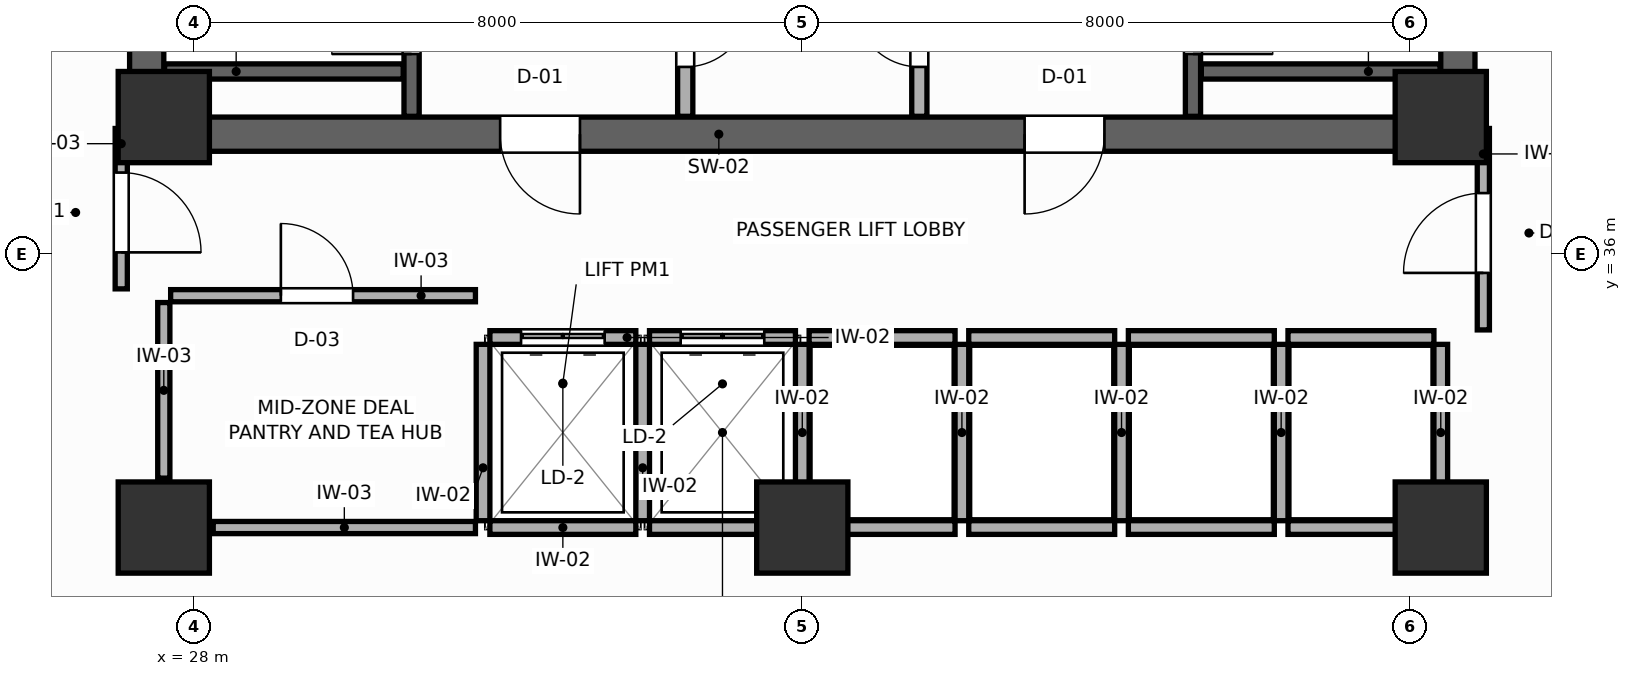
"""IFC4 building model, lengths in metres.
Left out: names, types, materials, properties, quantities, classifications, styles, units other than length and angle.
Written with IfcOpenShell. Run it as: python <this file> out.ifc"""

import sys

from ifc_helpers import new_model, si_unit, direction, frame, frame_2d, origin, origin_2d, place, context, subcontext, project, spatial, rectangle, extrude, source, transform, mapped, element, fill, save


model = new_model("IFC4")
c1 = context("Model", 3, precision=1e-05, world=origin(), true_north=direction((0.0, 1.0)))
c2 = subcontext(c1, "Body", "Model", "MODEL_VIEW")
j1 = project(units=[si_unit("LENGTHUNIT", "METRE"), si_unit("PLANEANGLEUNIT", "RADIAN")], contexts=[c1])
p1 = place(None, origin())
s1 = spatial("IfcSite", under=j1, at=p1, CompositionType="ELEMENT")
p2 = place(p1, origin())
s2 = spatial("IfcBuilding", under=s1, at=p2, CompositionType="ELEMENT")
p3 = place(p2, frame((0.0, 0.0, 150.6)))
s3 = spatial("IfcBuildingStorey", under=s2, at=p3, CompositionType="ELEMENT", Elevation=150.6)
p4 = place(p3, frame((27.15, 37.575, 0.0), z_axis=(0.0, 0.0, 1.0), x_axis=(1.0, 0.0, 0.0)))
e1 = element("IfcWall", 1, at=p4, inside=s3, PredefinedType="SHEAR", context=c2, shape_type="SweptSolid", body=[
    extrude(rectangle(XDim=17.7, YDim=0.45, at=frame_2d((8.85, 0.0))), origin(), (0.0, 0.0, 1.0), 3.6),
])
p5 = place(p4, frame((4.875, 0.0, 0.0)))
e2 = element("IfcOpeningElement", 2, at=p5, cuts=e1, PredefinedType="OPENING", context=c2, shape_type="SweptSolid", body=[
    extrude(rectangle(XDim=1.05, YDim=2.1, at=frame_2d((0.525, 1.05))), frame((0.0, 0.235, 0.0), z_axis=(0.0, -1.0, 0.0), x_axis=(1.0, 0.0, 0.0)), (0.0, 0.0, 1.0), 0.47),
])
p6 = place(p4, frame((11.775, 0.0, 0.0)))
e3 = element("IfcOpeningElement", 3, at=p6, cuts=e1, PredefinedType="OPENING", context=c2, shape_type="SweptSolid", body=[
    extrude(rectangle(XDim=1.05, YDim=2.1, at=frame_2d((0.525, 1.05))), frame((0.0, 0.235, 0.0), z_axis=(0.0, -1.0, 0.0), x_axis=(1.0, 0.0, 0.0)), (0.0, 0.0, 1.0), 0.47),
])
for number, where, z_axis, x_axis in (
    (4, (27.375, 37.8, 0.0), (0.0, 0.0, 1.0), (0.0, 1.0, 0.0)),
    (5, (44.625, 37.8, 0.0), (0.0, 0.0, 1.0), (0.0, 1.0, 0.0)),
):
    element("IfcWall", number, at=place(p3, frame(where, z_axis=z_axis, x_axis=x_axis)), inside=s3, PredefinedType="SHEAR", context=c2, shape_type="SweptSolid", body=[
        extrude(rectangle(XDim=9.0, YDim=0.45, at=frame_2d((4.5, 0.0))), origin(), (0.0, 0.0, 1.0), 3.6),
    ])
m1 = source(origin(), c2, "Body", "SweptSolid", [
    extrude(rectangle(XDim=1.2, YDim=1.2, at=origin_2d()), origin(), (0.0, 0.0, 1.0), 3.6),
])
for number, where, z_axis, x_axis in (
    (6, (27.6, 37.8, 0.0), (0.0, 0.0, 1.0), (1.0, 0.0, 0.0)),
    (7, (44.4, 37.8, 0.0), (0.0, 0.0, 1.0), (1.0, 0.0, 0.0)),
    (8, (27.6, 32.4, 0.0), (0.0, 0.0, 1.0), (1.0, 0.0, 0.0)),
    (9, (44.4, 32.4, 0.0), (0.0, 0.0, 1.0), (1.0, 0.0, 0.0)),
    (10, (36.0, 32.4, 0.0), (0.0, 0.0, 1.0), (1.0, 0.0, 0.0)),
):
    element("IfcColumn", number, at=place(p3, frame(where, z_axis=z_axis, x_axis=x_axis)), inside=s3, PredefinedType="COLUMN", context=c2, shape_type="MappedRepresentation", body=[
        mapped(m1, transform((0.0, 0.0, 0.0), scale=1.0)),
    ])
p7 = place(p3, frame((30.86, 37.81, 0.0), z_axis=(0.0, 0.0, 1.0), x_axis=(0.0, 1.0, 0.0)))
e11 = element("IfcWall", 11, at=p7, inside=s3, PredefinedType="SHEAR", context=c2, shape_type="SweptSolid", body=[
    extrude(rectangle(XDim=8.98, YDim=0.2, at=frame_2d((4.49, 0.0))), origin(), (0.0, 0.0, 1.0), 3.6),
])
p8 = place(p7, frame((0.82, 0.0, 0.0)))
e12 = element("IfcOpeningElement", 12, at=p8, cuts=e11, PredefinedType="OPENING", context=c2, shape_type="SweptSolid", body=[
    extrude(rectangle(XDim=1.05, YDim=2.1, at=frame_2d((0.525, 1.05))), frame((0.0, 0.11, 0.0), z_axis=(0.0, -1.0, 0.0), x_axis=(1.0, 0.0, 0.0)), (0.0, 0.0, 1.0), 0.22),
])
p9 = place(p3, frame((27.61, 38.4, 0.0), z_axis=(0.0, 0.0, 1.0), x_axis=(1.0, 0.0, 0.0)))
e13 = element("IfcWall", 13, at=p9, inside=s3, PredefinedType="SHEAR", context=c2, shape_type="SweptSolid", body=[
    extrude(rectangle(XDim=3.14, YDim=0.2, at=frame_2d((1.57, 0.0))), origin(), (0.0, 0.0, 1.0), 3.6),
])
p10 = place(p3, frame((41.14, 37.81, 0.0), z_axis=(0.0, 0.0, 1.0), x_axis=(0.0, 1.0, 0.0)))
e14 = element("IfcWall", 14, at=p10, inside=s3, PredefinedType="SHEAR", context=c2, shape_type="SweptSolid", body=[
    extrude(rectangle(XDim=8.98, YDim=0.2, at=frame_2d((4.49, 0.0))), origin(), (0.0, 0.0, 1.0), 3.6),
])
p11 = place(p10, frame((0.82, 0.0, 0.0)))
e15 = element("IfcOpeningElement", 15, at=p11, cuts=e14, PredefinedType="OPENING", context=c2, shape_type="SweptSolid", body=[
    extrude(rectangle(XDim=1.05, YDim=2.1, at=frame_2d((0.525, 1.05))), frame((0.0, 0.11, 0.0), z_axis=(0.0, -1.0, 0.0), x_axis=(1.0, 0.0, 0.0)), (0.0, 0.0, 1.0), 0.22),
])
p12 = place(p3, frame((41.25, 38.4, 0.0), z_axis=(0.0, 0.0, 1.0), x_axis=(1.0, 0.0, 0.0)))
e16 = element("IfcWall", 16, at=p12, inside=s3, PredefinedType="SHEAR", context=c2, shape_type="SweptSolid", body=[
    extrude(rectangle(XDim=3.14, YDim=0.2, at=frame_2d((1.57, 0.0))), origin(), (0.0, 0.0, 1.0), 3.6),
])
p13 = place(p3, frame((34.46, 37.81, 0.0), z_axis=(0.0, 0.0, 1.0), x_axis=(0.0, 1.0, 0.0)))
e17 = element("IfcWall", 17, at=p13, inside=s3, PredefinedType="PARTITIONING", context=c2, shape_type="SweptSolid", body=[
    extrude(rectangle(XDim=8.98, YDim=0.2, at=frame_2d((4.49, 0.0))), origin(), (0.0, 0.0, 1.0), 3.4),
])
p14 = place(p13, frame((0.65, 0.0, 0.0)))
e18 = element("IfcOpeningElement", 18, at=p14, cuts=e17, PredefinedType="OPENING", context=c2, shape_type="SweptSolid", body=[
    extrude(rectangle(XDim=0.85, YDim=2.05, at=frame_2d((0.425, 1.025))), frame((0.0, 0.11, 0.0), z_axis=(0.0, -1.0, 0.0), x_axis=(1.0, 0.0, 0.0)), (0.0, 0.0, 1.0), 0.22),
])
p15 = place(p3, frame((37.54, 37.81, 0.0), z_axis=(0.0, 0.0, 1.0), x_axis=(0.0, 1.0, 0.0)))
e19 = element("IfcWall", 19, at=p15, inside=s3, PredefinedType="PARTITIONING", context=c2, shape_type="SweptSolid", body=[
    extrude(rectangle(XDim=8.98, YDim=0.2, at=frame_2d((4.49, 0.0))), origin(), (0.0, 0.0, 1.0), 3.4),
])
p16 = place(p15, frame((0.65, 0.0, 0.0)))
e20 = element("IfcOpeningElement", 20, at=p16, cuts=e19, PredefinedType="OPENING", context=c2, shape_type="SweptSolid", body=[
    extrude(rectangle(XDim=0.85, YDim=2.05, at=frame_2d((0.425, 1.025))), frame((0.0, 0.11, 0.0), z_axis=(0.0, -1.0, 0.0), x_axis=(1.0, 0.0, 0.0)), (0.0, 0.0, 1.0), 0.22),
])
p17 = place(p3, frame((31.89, 34.9, 0.0), z_axis=(0.0, 0.0, 1.0), x_axis=(1.0, 0.0, 0.0)))
e21 = element("IfcWall", 21, at=p17, inside=s3, PredefinedType="PARTITIONING", context=c2, shape_type="SweptSolid", body=[
    extrude(rectangle(XDim=1.92, YDim=0.18, at=frame_2d((0.96, 0.0))), origin(), (0.0, 0.0, 1.0), 3.4),
])
p18 = place(p17, frame((0.41, 0.0, 0.0)))
e22 = element("IfcOpeningElement", 22, at=p18, cuts=e21, PredefinedType="OPENING", context=c2, shape_type="SweptSolid", body=[
    extrude(rectangle(XDim=1.1, YDim=2.1, at=frame_2d((0.55, 1.05))), frame((0.0, 0.1, 0.0), z_axis=(0.0, -1.0, 0.0), x_axis=(1.0, 0.0, 0.0)), (0.0, 0.0, 1.0), 0.2),
])
p19 = place(p3, frame((31.89, 32.4, 0.0), z_axis=(0.0, 0.0, 1.0), x_axis=(1.0, 0.0, 0.0)))
e23 = element("IfcWall", 23, at=p19, inside=s3, PredefinedType="PARTITIONING", context=c2, shape_type="SweptSolid", body=[
    extrude(rectangle(XDim=1.92, YDim=0.18, at=frame_2d((0.96, 0.0))), origin(), (0.0, 0.0, 1.0), 2.95),
])
p20 = place(p3, frame((31.8, 32.49, 0.0), z_axis=(0.0, 0.0, 1.0), x_axis=(0.0, 1.0, 0.0)))
e24 = element("IfcWall", 24, at=p20, inside=s3, PredefinedType="PARTITIONING", context=c2, shape_type="SweptSolid", body=[
    extrude(rectangle(XDim=2.32, YDim=0.18, at=frame_2d((1.16, 0.0))), origin(), (0.0, 0.0, 1.0), 3.4),
])
p21 = place(p3, frame((33.99, 34.9, 0.0), z_axis=(0.0, 0.0, 1.0), x_axis=(1.0, 0.0, 0.0)))
e25 = element("IfcWall", 25, at=p21, inside=s3, PredefinedType="PARTITIONING", context=c2, shape_type="SweptSolid", body=[
    extrude(rectangle(XDim=1.92, YDim=0.18, at=frame_2d((0.96, 0.0))), origin(), (0.0, 0.0, 1.0), 3.4),
])
p22 = place(p21, frame((0.41, 0.0, 0.0)))
e26 = element("IfcOpeningElement", 26, at=p22, cuts=e25, PredefinedType="OPENING", context=c2, shape_type="SweptSolid", body=[
    extrude(rectangle(XDim=1.1, YDim=2.1, at=frame_2d((0.55, 1.05))), frame((0.0, 0.1, 0.0), z_axis=(0.0, -1.0, 0.0), x_axis=(1.0, 0.0, 0.0)), (0.0, 0.0, 1.0), 0.2),
])
p23 = place(p3, frame((33.99, 32.4, 0.0), z_axis=(0.0, 0.0, 1.0), x_axis=(1.0, 0.0, 0.0)))
e27 = element("IfcWall", 27, at=p23, inside=s3, PredefinedType="PARTITIONING", context=c2, shape_type="SweptSolid", body=[
    extrude(rectangle(XDim=1.92, YDim=0.18, at=frame_2d((0.96, 0.0))), origin(), (0.0, 0.0, 1.0), 2.95),
])
p24 = place(p3, frame((33.9, 32.49, 0.0), z_axis=(0.0, 0.0, 1.0), x_axis=(0.0, 1.0, 0.0)))
e28 = element("IfcWall", 28, at=p24, inside=s3, PredefinedType="PARTITIONING", context=c2, shape_type="SweptSolid", body=[
    extrude(rectangle(XDim=2.32, YDim=0.18, at=frame_2d((1.16, 0.0))), origin(), (0.0, 0.0, 1.0), 3.4),
])
p25 = place(p3, frame((36.09, 34.9, 0.0), z_axis=(0.0, 0.0, 1.0), x_axis=(1.0, 0.0, 0.0)))
e29 = element("IfcWall", 29, at=p25, inside=s3, PredefinedType="PARTITIONING", context=c2, shape_type="SweptSolid", body=[
    extrude(rectangle(XDim=1.92, YDim=0.18, at=frame_2d((0.96, 0.0))), origin(), (0.0, 0.0, 1.0), 3.4),
])
p26 = place(p3, frame((36.09, 32.4, 0.0), z_axis=(0.0, 0.0, 1.0), x_axis=(1.0, 0.0, 0.0)))
e30 = element("IfcWall", 30, at=p26, inside=s3, PredefinedType="PARTITIONING", context=c2, shape_type="SweptSolid", body=[
    extrude(rectangle(XDim=1.92, YDim=0.18, at=frame_2d((0.96, 0.0))), origin(), (0.0, 0.0, 1.0), 2.95),
])
p27 = place(p3, frame((36.0, 32.49, 0.0), z_axis=(0.0, 0.0, 1.0), x_axis=(0.0, 1.0, 0.0)))
e31 = element("IfcWall", 31, at=p27, inside=s3, PredefinedType="PARTITIONING", context=c2, shape_type="SweptSolid", body=[
    extrude(rectangle(XDim=2.32, YDim=0.18, at=frame_2d((1.16, 0.0))), origin(), (0.0, 0.0, 1.0), 3.4),
])
p28 = place(p3, frame((38.19, 34.9, 0.0), z_axis=(0.0, 0.0, 1.0), x_axis=(1.0, 0.0, 0.0)))
e32 = element("IfcWall", 32, at=p28, inside=s3, PredefinedType="PARTITIONING", context=c2, shape_type="SweptSolid", body=[
    extrude(rectangle(XDim=1.92, YDim=0.18, at=frame_2d((0.96, 0.0))), origin(), (0.0, 0.0, 1.0), 3.4),
])
p29 = place(p3, frame((38.19, 32.4, 0.0), z_axis=(0.0, 0.0, 1.0), x_axis=(1.0, 0.0, 0.0)))
e33 = element("IfcWall", 33, at=p29, inside=s3, PredefinedType="PARTITIONING", context=c2, shape_type="SweptSolid", body=[
    extrude(rectangle(XDim=1.92, YDim=0.18, at=frame_2d((0.96, 0.0))), origin(), (0.0, 0.0, 1.0), 2.95),
])
p30 = place(p3, frame((38.1, 32.49, 0.0), z_axis=(0.0, 0.0, 1.0), x_axis=(0.0, 1.0, 0.0)))
e34 = element("IfcWall", 34, at=p30, inside=s3, PredefinedType="PARTITIONING", context=c2, shape_type="SweptSolid", body=[
    extrude(rectangle(XDim=2.32, YDim=0.18, at=frame_2d((1.16, 0.0))), origin(), (0.0, 0.0, 1.0), 3.4),
])
p31 = place(p3, frame((40.29, 34.9, 0.0), z_axis=(0.0, 0.0, 1.0), x_axis=(1.0, 0.0, 0.0)))
e35 = element("IfcWall", 35, at=p31, inside=s3, PredefinedType="PARTITIONING", context=c2, shape_type="SweptSolid", body=[
    extrude(rectangle(XDim=1.92, YDim=0.18, at=frame_2d((0.96, 0.0))), origin(), (0.0, 0.0, 1.0), 3.4),
])
p32 = place(p3, frame((40.29, 32.4, 0.0), z_axis=(0.0, 0.0, 1.0), x_axis=(1.0, 0.0, 0.0)))
e36 = element("IfcWall", 36, at=p32, inside=s3, PredefinedType="PARTITIONING", context=c2, shape_type="SweptSolid", body=[
    extrude(rectangle(XDim=1.92, YDim=0.18, at=frame_2d((0.96, 0.0))), origin(), (0.0, 0.0, 1.0), 2.95),
])
p33 = place(p3, frame((40.2, 32.49, 0.0), z_axis=(0.0, 0.0, 1.0), x_axis=(0.0, 1.0, 0.0)))
e37 = element("IfcWall", 37, at=p33, inside=s3, PredefinedType="PARTITIONING", context=c2, shape_type="SweptSolid", body=[
    extrude(rectangle(XDim=2.32, YDim=0.18, at=frame_2d((1.16, 0.0))), origin(), (0.0, 0.0, 1.0), 3.4),
])
p34 = place(p3, frame((42.39, 34.9, 0.0), z_axis=(0.0, 0.0, 1.0), x_axis=(1.0, 0.0, 0.0)))
e38 = element("IfcWall", 38, at=p34, inside=s3, PredefinedType="PARTITIONING", context=c2, shape_type="SweptSolid", body=[
    extrude(rectangle(XDim=1.92, YDim=0.18, at=frame_2d((0.96, 0.0))), origin(), (0.0, 0.0, 1.0), 3.4),
])
p35 = place(p3, frame((42.39, 32.4, 0.0), z_axis=(0.0, 0.0, 1.0), x_axis=(1.0, 0.0, 0.0)))
e39 = element("IfcWall", 39, at=p35, inside=s3, PredefinedType="PARTITIONING", context=c2, shape_type="SweptSolid", body=[
    extrude(rectangle(XDim=1.92, YDim=0.18, at=frame_2d((0.96, 0.0))), origin(), (0.0, 0.0, 1.0), 2.95),
])
for number, where, z_axis, x_axis in (
    (40, (42.3, 32.49, 0.0), (0.0, 0.0, 1.0), (0.0, 1.0, 0.0)),
    (41, (44.4, 32.49, 0.0), (0.0, 0.0, 1.0), (0.0, 1.0, 0.0)),
):
    element("IfcWall", number, at=place(p3, frame(where, z_axis=z_axis, x_axis=x_axis)), inside=s3, PredefinedType="PARTITIONING", context=c2, shape_type="SweptSolid", body=[
        extrude(rectangle(XDim=2.32, YDim=0.18, at=frame_2d((1.16, 0.0))), origin(), (0.0, 0.0, 1.0), 3.4),
    ])
p36 = place(p3, frame((28.25, 32.4, 0.0), z_axis=(0.0, 0.0, 1.0), x_axis=(1.0, 0.0, 0.0)))
e42 = element("IfcWall", 42, at=p36, inside=s3, PredefinedType="PARTITIONING", context=c2, shape_type="SweptSolid", body=[
    extrude(rectangle(XDim=3.45, YDim=0.16, at=frame_2d((1.725, 0.0))), origin(), (0.0, 0.0, 1.0), 2.95),
])
p37 = place(p3, frame((27.6, 33.05, 0.0), z_axis=(0.0, 0.0, 1.0), x_axis=(0.0, 1.0, 0.0)))
e43 = element("IfcWall", 43, at=p37, inside=s3, PredefinedType="PARTITIONING", context=c2, shape_type="SweptSolid", body=[
    extrude(rectangle(XDim=2.31, YDim=0.16, at=frame_2d((1.155, 0.0))), origin(), (0.0, 0.0, 1.0), 3.4),
])
p38 = place(p3, frame((27.69, 35.45, 0.0), z_axis=(0.0, 0.0, 1.0), x_axis=(1.0, 0.0, 0.0)))
e44 = element("IfcWall", 44, at=p38, inside=s3, PredefinedType="PARTITIONING", context=c2, shape_type="SweptSolid", body=[
    extrude(rectangle(XDim=4.01, YDim=0.16, at=frame_2d((2.005, 0.0))), origin(), (0.0, 0.0, 1.0), 3.4),
])
p39 = place(p38, frame((1.45, 0.0, 0.0)))
e45 = element("IfcOpeningElement", 45, at=p39, cuts=e44, PredefinedType="OPENING", context=c2, shape_type="SweptSolid", body=[
    extrude(rectangle(XDim=0.95, YDim=2.05, at=frame_2d((0.475, 1.025))), frame((0.0, 0.09, 0.0), z_axis=(0.0, -1.0, 0.0), x_axis=(1.0, 0.0, 0.0)), (0.0, 0.0, 1.0), 0.18),
])
p40 = place(p3, frame((27.04, 35.54, 0.0), z_axis=(0.0, 0.0, 1.0), x_axis=(0.0, 1.0, 0.0)))
e46 = element("IfcWall", 46, at=p40, inside=s3, PredefinedType="PARTITIONING", context=c2, shape_type="SweptSolid", body=[
    extrude(rectangle(XDim=2.11, YDim=0.16, at=frame_2d((1.055, 0.0))), origin(), (0.0, 0.0, 1.0), 3.4),
])
p41 = place(p40, frame((0.48, 0.0, 0.0)))
e47 = element("IfcOpeningElement", 47, at=p41, cuts=e46, PredefinedType="OPENING", context=c2, shape_type="SweptSolid", body=[
    extrude(rectangle(XDim=1.05, YDim=2.1, at=frame_2d((0.525, 1.05))), frame((0.0, 0.09, 0.0), z_axis=(0.0, -1.0, 0.0), x_axis=(1.0, 0.0, 0.0)), (0.0, 0.0, 1.0), 0.18),
])
p42 = place(p3, frame((44.96, 35.0, 0.0), z_axis=(0.0, 0.0, 1.0), x_axis=(0.0, 1.0, 0.0)))
e48 = element("IfcWall", 48, at=p42, inside=s3, PredefinedType="PARTITIONING", context=c2, shape_type="SweptSolid", body=[
    extrude(rectangle(XDim=2.65, YDim=0.16, at=frame_2d((1.325, 0.0))), origin(), (0.0, 0.0, 1.0), 3.4),
])
p43 = place(p42, frame((0.75, 0.0, 0.0)))
e49 = element("IfcOpeningElement", 49, at=p43, cuts=e48, PredefinedType="OPENING", context=c2, shape_type="SweptSolid", body=[
    extrude(rectangle(XDim=1.05, YDim=2.1, at=frame_2d((0.525, 1.05))), frame((0.0, 0.09, 0.0), z_axis=(0.0, -1.0, 0.0), x_axis=(1.0, 0.0, 0.0)), (0.0, 0.0, 1.0), 0.18),
])
p44 = place(p8, origin())
e50 = element("IfcDoor", 50, at=p44, inside=s3, OperationType="SINGLE_SWING_LEFT", PredefinedType="DOOR", context=c2, shape_type="SweptSolid", body=[
    extrude(rectangle(XDim=1.05, YDim=2.1, at=frame_2d((0.525, 1.05))), frame((0.0, 0.025, 0.0), z_axis=(0.0, -1.0, 0.0), x_axis=(1.0, 0.0, 0.0)), (0.0, 0.0, 1.0), 0.05),
])
fill(e12, e50)
p45 = place(p11, frame((1.05, 0.0, 0.0), z_axis=(0.0, 0.0, 1.0), x_axis=(-1.0, 0.0, 0.0)))
e51 = element("IfcDoor", 51, at=p45, inside=s3, OperationType="SINGLE_SWING_RIGHT", PredefinedType="DOOR", context=c2, shape_type="SweptSolid", body=[
    extrude(rectangle(XDim=1.05, YDim=2.1, at=frame_2d((0.525, 1.05))), frame((0.0, 0.025, 0.0), z_axis=(0.0, -1.0, 0.0), x_axis=(1.0, 0.0, 0.0)), (0.0, 0.0, 1.0), 0.05),
])
fill(e15, e51)
p46 = place(p14, frame((0.85, 0.0, 0.0), z_axis=(0.0, 0.0, 1.0), x_axis=(-1.0, 0.0, 0.0)))
e52 = element("IfcDoor", 52, at=p46, inside=s3, OperationType="SINGLE_SWING_LEFT", PredefinedType="DOOR", context=c2, shape_type="SweptSolid", body=[
    extrude(rectangle(XDim=0.85, YDim=2.05, at=frame_2d((0.425, 1.025))), frame((0.0, 0.025, 0.0), z_axis=(0.0, -1.0, 0.0), x_axis=(1.0, 0.0, 0.0)), (0.0, 0.0, 1.0), 0.05),
])
fill(e18, e52)
p47 = place(p16, origin())
e53 = element("IfcDoor", 53, at=p47, inside=s3, OperationType="SINGLE_SWING_RIGHT", PredefinedType="DOOR", context=c2, shape_type="SweptSolid", body=[
    extrude(rectangle(XDim=0.85, YDim=2.05, at=frame_2d((0.425, 1.025))), frame((0.0, 0.025, 0.0), z_axis=(0.0, -1.0, 0.0), x_axis=(1.0, 0.0, 0.0)), (0.0, 0.0, 1.0), 0.05),
])
fill(e20, e53)
p48 = place(p18, origin())
e54 = element("IfcDoor", 54, at=p48, inside=s3, OperationType="DOUBLE_DOOR_SLIDING", PredefinedType="DOOR", context=c2, shape_type="SweptSolid", body=[
    extrude(rectangle(XDim=1.1, YDim=2.1, at=frame_2d((0.55, 1.05))), frame((0.0, 0.025, 0.0), z_axis=(0.0, -1.0, 0.0), x_axis=(1.0, 0.0, 0.0)), (0.0, 0.0, 1.0), 0.05),
])
fill(e22, e54)
p49 = place(p22, origin())
e55 = element("IfcDoor", 55, at=p49, inside=s3, OperationType="DOUBLE_DOOR_SLIDING", PredefinedType="DOOR", context=c2, shape_type="SweptSolid", body=[
    extrude(rectangle(XDim=1.1, YDim=2.1, at=frame_2d((0.55, 1.05))), frame((0.0, 0.025, 0.0), z_axis=(0.0, -1.0, 0.0), x_axis=(1.0, 0.0, 0.0)), (0.0, 0.0, 1.0), 0.05),
])
fill(e26, e55)
p50 = place(p39, origin())
e56 = element("IfcDoor", 56, at=p50, inside=s3, OperationType="SINGLE_SWING_LEFT", PredefinedType="DOOR", context=c2, shape_type="SweptSolid", body=[
    extrude(rectangle(XDim=0.95, YDim=2.05, at=frame_2d((0.475, 1.025))), frame((0.0, 0.025, 0.0), z_axis=(0.0, -1.0, 0.0), x_axis=(1.0, 0.0, 0.0)), (0.0, 0.0, 1.0), 0.05),
])
fill(e45, e56)
p51 = place(p41, frame((1.05, 0.0, 0.0), z_axis=(0.0, 0.0, 1.0), x_axis=(-1.0, 0.0, 0.0)))
e57 = element("IfcDoor", 57, at=p51, inside=s3, OperationType="SINGLE_SWING_RIGHT", PredefinedType="DOOR", context=c2, shape_type="SweptSolid", body=[
    extrude(rectangle(XDim=1.05, YDim=2.1, at=frame_2d((0.525, 1.05))), frame((0.0, 0.025, 0.0), z_axis=(0.0, -1.0, 0.0), x_axis=(1.0, 0.0, 0.0)), (0.0, 0.0, 1.0), 0.05),
])
fill(e47, e57)
p52 = place(p43, origin())
e58 = element("IfcDoor", 58, at=p52, inside=s3, OperationType="SINGLE_SWING_LEFT", PredefinedType="DOOR", context=c2, shape_type="SweptSolid", body=[
    extrude(rectangle(XDim=1.05, YDim=2.1, at=frame_2d((0.525, 1.05))), frame((0.0, 0.025, 0.0), z_axis=(0.0, -1.0, 0.0), x_axis=(1.0, 0.0, 0.0)), (0.0, 0.0, 1.0), 0.05),
])
fill(e49, e58)
p53 = place(p5, frame((1.05, 0.0, 0.0), z_axis=(0.0, 0.0, 1.0), x_axis=(-1.0, 0.0, 0.0)))
e59 = element("IfcDoor", 59, at=p53, inside=s3, OperationType="SINGLE_SWING_LEFT", PredefinedType="DOOR", context=c2, shape_type="SweptSolid", body=[
    extrude(rectangle(XDim=1.05, YDim=2.1, at=frame_2d((0.525, 1.05))), frame((0.0, 0.025, 0.0), z_axis=(0.0, -1.0, 0.0), x_axis=(1.0, 0.0, 0.0)), (0.0, 0.0, 1.0), 0.05),
])
fill(e2, e59)
p54 = place(p6, frame((1.05, 0.0, 0.0), z_axis=(0.0, 0.0, 1.0), x_axis=(-1.0, 0.0, 0.0)))
e60 = element("IfcDoor", 60, at=p54, inside=s3, OperationType="SINGLE_SWING_RIGHT", PredefinedType="DOOR", context=c2, shape_type="SweptSolid", body=[
    extrude(rectangle(XDim=1.05, YDim=2.1, at=frame_2d((0.525, 1.05))), frame((0.0, 0.025, 0.0), z_axis=(0.0, -1.0, 0.0), x_axis=(1.0, 0.0, 0.0)), (0.0, 0.0, 1.0), 0.05),
])
fill(e3, e60)
save(model, sys.argv[1])
